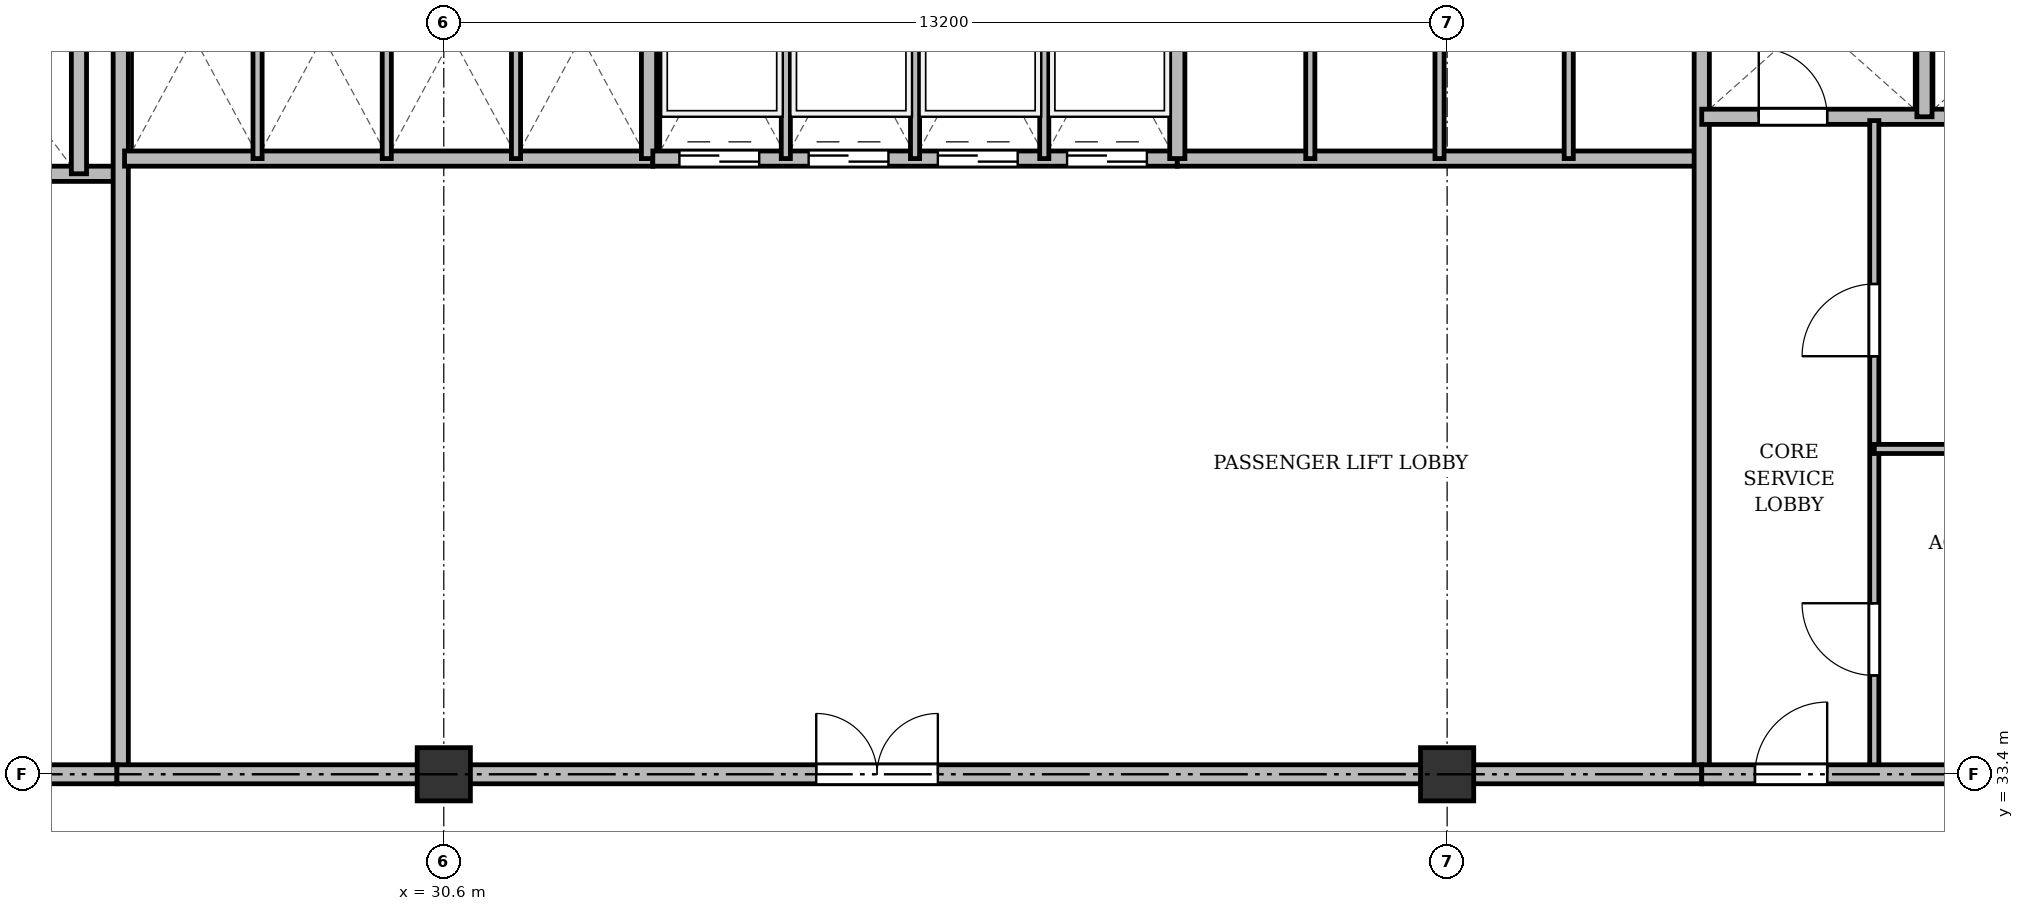
"""IFC4 building model, lengths in metres.
Left out: names, types, materials, properties, quantities, classifications, styles, units other than length and angle.
Written with IfcOpenShell. Run it as: python <this file> out.ifc"""

import sys

from ifc_helpers import new_model, si_unit, direction, frame, frame_2d, origin, origin_2d, place, context, subcontext, project, spatial, rectangle, extrude, source, transform, mapped, element, fill, save


model = new_model("IFC4")
c1 = context("Model", 3, precision=1e-05, world=origin(), true_north=direction((0.0, 1.0)))
c2 = subcontext(c1, "Body", "Model", "MODEL_VIEW")
j1 = project(units=[si_unit("LENGTHUNIT", "METRE"), si_unit("PLANEANGLEUNIT", "RADIAN")], contexts=[c1])
p1 = place(None, origin())
s1 = spatial("IfcSite", under=j1, at=p1, CompositionType="ELEMENT")
p2 = place(p1, origin())
s2 = spatial("IfcBuilding", under=s1, at=p2, CompositionType="ELEMENT")
p3 = place(p2, frame((0.0, 0.0, 132.1)))
s3 = spatial("IfcBuildingStorey", under=s2, at=p3, CompositionType="ELEMENT", Elevation=132.1)
m1 = source(origin(), c2, "Body", "SweptSolid", [
    extrude(rectangle(XDim=0.7, YDim=0.7, at=origin_2d()), origin(), (0.0, 0.0, 1.0), 3.6),
])
for number, where, z_axis, x_axis in (
    (1, (30.6, 33.4, 0.0), (0.0, 0.0, 1.0), (1.0, 0.0, 0.0)),
    (2, (43.8, 33.4, 0.0), (0.0, 0.0, 1.0), (1.0, 0.0, 0.0)),
):
    element("IfcColumn", number, at=place(p3, frame(where, z_axis=z_axis, x_axis=x_axis)), inside=s3, PredefinedType="COLUMN", context=c2, shape_type="MappedRepresentation", body=[
        mapped(m1, transform((0.0, 0.0, 0.0), x_axis=(1.0, 0.0, 0.0), y_axis=(0.0, 1.0, 0.0), z_axis=(0.0, 0.0, 1.0), scale=1.0)),
    ])
p4 = place(p3, frame((19.55, 41.3, 0.0), z_axis=(0.0, 0.0, 1.0), x_axis=(1.0, 0.0, 0.0)))
e3 = element("IfcWall", 3, at=p4, inside=s3, PredefinedType="SOLIDWALL", context=c2, shape_type="SweptSolid", body=[
    extrude(rectangle(XDim=6.75, YDim=0.2, at=frame_2d((3.375, 0.0))), origin(), (0.0, 0.0, 1.0), 3.35),
])
p5 = place(p4, frame((1.7, 0.0, 0.0)))
e4 = element("IfcOpeningElement", 4, at=p5, cuts=e3, PredefinedType="OPENING", context=c2, shape_type="SweptSolid", body=[
    extrude(rectangle(XDim=1.1, YDim=2.15, at=frame_2d((0.55, 1.075))), frame((0.0, 0.11, 0.0), z_axis=(0.0, -1.0, 0.0), x_axis=(1.0, 0.0, 0.0)), (0.0, 0.0, 1.0), 0.22),
])
p6 = place(p4, frame((4.4, 0.0, 0.0)))
e5 = element("IfcOpeningElement", 5, at=p6, cuts=e3, PredefinedType="OPENING", context=c2, shape_type="SweptSolid", body=[
    extrude(rectangle(XDim=1.1, YDim=2.15, at=frame_2d((0.55, 1.075))), frame((0.0, 0.11, 0.0), z_axis=(0.0, -1.0, 0.0), x_axis=(1.0, 0.0, 0.0)), (0.0, 0.0, 1.0), 0.22),
])
p7 = place(p3, frame((25.8, 41.3, 0.0), z_axis=(0.0, 0.0, 1.0), x_axis=(0.0, 1.0, 0.0)))
e6 = element("IfcWall", 6, at=p7, inside=s3, PredefinedType="SOLIDWALL", context=c2, shape_type="SweptSolid", body=[
    extrude(rectangle(XDim=3.4, YDim=0.2, at=frame_2d((1.7, 0.0))), origin(), (0.0, 0.0, 1.0), 3.35),
])
p8 = place(p3, frame((26.35, 33.4, 0.0), z_axis=(0.0, 0.0, 1.0), x_axis=(0.0, 1.0, 0.0)))
e7 = element("IfcWall", 7, at=p8, inside=s3, PredefinedType="SOLIDWALL", context=c2, shape_type="SweptSolid", body=[
    extrude(rectangle(XDim=11.3, YDim=0.2, at=frame_2d((5.65, 0.0))), origin(), (0.0, 0.0, 1.0), 2.75),
])
p9 = place(p3, frame((19.5, 33.4, 0.0), z_axis=(0.0, 0.0, 1.0), x_axis=(1.0, 0.0, 0.0)))
e8 = element("IfcWall", 8, at=p9, inside=s3, PredefinedType="PARTITIONING", context=c2, shape_type="SweptSolid", body=[
    extrude(rectangle(XDim=6.8, YDim=0.25, at=frame_2d((3.4, 0.0))), origin(), (0.0, 0.0, 1.0), 2.75),
])
p10 = place(p9, frame((0.75, 0.0, 0.0)))
e9 = element("IfcOpeningElement", 9, at=p10, cuts=e8, PredefinedType="OPENING", context=c2, shape_type="SweptSolid", body=[
    extrude(rectangle(XDim=1.6, YDim=2.2, at=frame_2d((0.8, 1.1))), frame((0.0, 0.135, 0.0), z_axis=(0.0, -1.0, 0.0), x_axis=(1.0, 0.0, 0.0)), (0.0, 0.0, 1.0), 0.27),
])
p11 = place(p3, frame((26.4, 41.5, 0.0), z_axis=(0.0, 0.0, 1.0), x_axis=(1.0, 0.0, 0.0)))
e10 = element("IfcWall", 10, at=p11, inside=s3, PredefinedType="SOLIDWALL", context=c2, shape_type="SweptSolid", body=[
    extrude(rectangle(XDim=6.95, YDim=0.2, at=frame_2d((3.475, 0.0))), origin(), (0.0, 0.0, 1.0), 2.85),
])
p12 = place(p3, frame((33.3, 41.5, 0.0), z_axis=(0.0, 0.0, 1.0), x_axis=(0.0, 1.0, 0.0)))
e11 = element("IfcWall", 11, at=p12, inside=s3, PredefinedType="SOLIDWALL", context=c2, shape_type="SweptSolid", body=[
    extrude(rectangle(XDim=3.2, YDim=0.2, at=frame_2d((1.6, 0.0))), origin(), (0.0, 0.0, 1.0), 3.35),
])
for number, where, z_axis, x_axis in (
    (12, (28.15, 41.5, 0.0), (0.0, 0.0, 1.0), (0.0, 1.0, 0.0)),
    (13, (29.85, 41.5, 0.0), (0.0, 0.0, 1.0), (0.0, 1.0, 0.0)),
    (14, (31.55, 41.5, 0.0), (0.0, 0.0, 1.0), (0.0, 1.0, 0.0)),
):
    element("IfcWall", number, at=place(p3, frame(where, z_axis=z_axis, x_axis=x_axis)), inside=s3, PredefinedType="PARTITIONING", context=c2, shape_type="SweptSolid", body=[
        extrude(rectangle(XDim=3.2, YDim=0.12, at=frame_2d((1.6, 0.0))), origin(), (0.0, 0.0, 1.0), 3.35),
    ])
p13 = place(p3, frame((33.35, 41.5, 0.0), z_axis=(0.0, 0.0, 1.0), x_axis=(1.0, 0.0, 0.0)))
e15 = element("IfcWall", 15, at=p13, inside=s3, PredefinedType="SOLIDWALL", context=c2, shape_type="SweptSolid", body=[
    extrude(rectangle(XDim=6.9, YDim=0.2, at=frame_2d((3.45, 0.0))), origin(), (0.0, 0.0, 1.0), 3.35),
])
p14 = place(p13, frame((0.35, 0.0, 0.0)))
e16 = element("IfcOpeningElement", 16, at=p14, cuts=e15, PredefinedType="OPENING", context=c2, shape_type="SweptSolid", body=[
    extrude(rectangle(XDim=1.05, YDim=2.15, at=frame_2d((0.525, 1.075))), frame((0.0, 0.11, 0.0), z_axis=(0.0, -1.0, 0.0), x_axis=(1.0, 0.0, 0.0)), (0.0, 0.0, 1.0), 0.22),
])
p15 = place(p13, frame((2.05, 0.0, 0.0)))
e17 = element("IfcOpeningElement", 17, at=p15, cuts=e15, PredefinedType="OPENING", context=c2, shape_type="SweptSolid", body=[
    extrude(rectangle(XDim=1.05, YDim=2.15, at=frame_2d((0.525, 1.075))), frame((0.0, 0.11, 0.0), z_axis=(0.0, -1.0, 0.0), x_axis=(1.0, 0.0, 0.0)), (0.0, 0.0, 1.0), 0.22),
])
p16 = place(p13, frame((3.75, 0.0, 0.0)))
e18 = element("IfcOpeningElement", 18, at=p16, cuts=e15, PredefinedType="OPENING", context=c2, shape_type="SweptSolid", body=[
    extrude(rectangle(XDim=1.05, YDim=2.15, at=frame_2d((0.525, 1.075))), frame((0.0, 0.11, 0.0), z_axis=(0.0, -1.0, 0.0), x_axis=(1.0, 0.0, 0.0)), (0.0, 0.0, 1.0), 0.22),
])
p17 = place(p13, frame((5.45, 0.0, 0.0)))
e19 = element("IfcOpeningElement", 19, at=p17, cuts=e15, PredefinedType="OPENING", context=c2, shape_type="SweptSolid", body=[
    extrude(rectangle(XDim=1.05, YDim=2.15, at=frame_2d((0.525, 1.075))), frame((0.0, 0.11, 0.0), z_axis=(0.0, -1.0, 0.0), x_axis=(1.0, 0.0, 0.0)), (0.0, 0.0, 1.0), 0.22),
])
for number, where, z_axis, x_axis in (
    (20, (35.1, 41.5, 0.0), (0.0, 0.0, 1.0), (0.0, 1.0, 0.0)),
    (21, (36.8, 41.5, 0.0), (0.0, 0.0, 1.0), (0.0, 1.0, 0.0)),
    (22, (38.5, 41.5, 0.0), (0.0, 0.0, 1.0), (0.0, 1.0, 0.0)),
):
    element("IfcWall", number, at=place(p3, frame(where, z_axis=z_axis, x_axis=x_axis)), inside=s3, PredefinedType="PARTITIONING", context=c2, shape_type="SweptSolid", body=[
        extrude(rectangle(XDim=3.2, YDim=0.12, at=frame_2d((1.6, 0.0))), origin(), (0.0, 0.0, 1.0), 3.35),
    ])
p18 = place(p3, frame((40.25, 41.5, 0.0), z_axis=(0.0, 0.0, 1.0), x_axis=(1.0, 0.0, 0.0)))
e23 = element("IfcWall", 23, at=p18, inside=s3, PredefinedType="SOLIDWALL", context=c2, shape_type="SweptSolid", body=[
    extrude(rectangle(XDim=6.9, YDim=0.2, at=frame_2d((3.45, 0.0))), origin(), (0.0, 0.0, 1.0), 2.85),
])
p19 = place(p3, frame((40.25, 41.5, 0.0), z_axis=(0.0, 0.0, 1.0), x_axis=(0.0, 1.0, 0.0)))
e24 = element("IfcWall", 24, at=p19, inside=s3, PredefinedType="SOLIDWALL", context=c2, shape_type="SweptSolid", body=[
    extrude(rectangle(XDim=3.2, YDim=0.2, at=frame_2d((1.6, 0.0))), origin(), (0.0, 0.0, 1.0), 3.35),
])
p20 = place(p3, frame((42.0, 41.5, 0.0), z_axis=(0.0, 0.0, 1.0), x_axis=(0.0, 1.0, 0.0)))
e25 = element("IfcWall", 25, at=p20, inside=s3, PredefinedType="PARTITIONING", context=c2, shape_type="SweptSolid", body=[
    extrude(rectangle(XDim=3.2, YDim=0.12, at=frame_2d((1.6, 0.0))), origin(), (0.0, 0.0, 1.0), 3.35),
])
p21 = place(p3, frame((43.7, 41.5, 0.0), z_axis=(0.0, 0.0, 1.0), x_axis=(0.0, 1.0, 0.0)))
e26 = element("IfcWall", 26, at=p21, inside=s3, PredefinedType="PARTITIONING", context=c2, shape_type="SweptSolid", body=[
    extrude(rectangle(XDim=3.2, YDim=0.12, at=frame_2d((1.6, 0.0))), origin(), (0.0, 0.0, 1.0), 2.85),
])
p22 = place(p3, frame((45.4, 41.5, 0.0), z_axis=(0.0, 0.0, 1.0), x_axis=(0.0, 1.0, 0.0)))
e27 = element("IfcWall", 27, at=p22, inside=s3, PredefinedType="PARTITIONING", context=c2, shape_type="SweptSolid", body=[
    extrude(rectangle(XDim=3.2, YDim=0.12, at=frame_2d((1.6, 0.0))), origin(), (0.0, 0.0, 1.0), 3.35),
])
p23 = place(p3, frame((47.15, 33.4, 0.0), z_axis=(0.0, 0.0, 1.0), x_axis=(0.0, 1.0, 0.0)))
e28 = element("IfcWall", 28, at=p23, inside=s3, PredefinedType="SOLIDWALL", context=c2, shape_type="SweptSolid", body=[
    extrude(rectangle(XDim=11.3, YDim=0.2, at=frame_2d((5.65, 0.0))), origin(), (0.0, 0.0, 1.0), 2.75),
])
p24 = place(p3, frame((26.3, 33.4, 0.0), z_axis=(0.0, 0.0, 1.0), x_axis=(1.0, 0.0, 0.0)))
e29 = element("IfcWall", 29, at=p24, inside=s3, PredefinedType="PARTITIONING", context=c2, shape_type="SweptSolid", body=[
    extrude(rectangle(XDim=20.85, YDim=0.25, at=frame_2d((10.425, 0.0))), origin(), (0.0, 0.0, 1.0), 2.75),
])
p25 = place(p24, frame((9.2, 0.0, 0.0)))
e30 = element("IfcOpeningElement", 30, at=p25, cuts=e29, PredefinedType="OPENING", context=c2, shape_type="SweptSolid", body=[
    extrude(rectangle(XDim=1.6, YDim=2.2, at=frame_2d((0.8, 1.1))), frame((0.0, 0.135, 0.0), z_axis=(0.0, -1.0, 0.0), x_axis=(1.0, 0.0, 0.0)), (0.0, 0.0, 1.0), 0.27),
])
p26 = place(p3, frame((47.15, 42.05, 0.0), z_axis=(0.0, 0.0, 1.0), x_axis=(1.0, 0.0, 0.0)))
e31 = element("IfcWall", 31, at=p26, inside=s3, PredefinedType="SOLIDWALL", context=c2, shape_type="SweptSolid", body=[
    extrude(rectangle(XDim=7.85, YDim=0.2, at=frame_2d((3.925, 0.0))), origin(), (0.0, 0.0, 1.0), 2.85),
])
p27 = place(p26, frame((0.75, 0.0, 0.0)))
e32 = element("IfcOpeningElement", 32, at=p27, cuts=e31, PredefinedType="OPENING", context=c2, shape_type="SweptSolid", body=[
    extrude(rectangle(XDim=0.9, YDim=2.1, at=frame_2d((0.45, 1.05))), frame((0.0, 0.11, 0.0), z_axis=(0.0, -1.0, 0.0), x_axis=(1.0, 0.0, 0.0)), (0.0, 0.0, 1.0), 0.22),
])
p28 = place(p26, frame((3.85, 0.0, 0.0)))
e33 = element("IfcOpeningElement", 33, at=p28, cuts=e31, PredefinedType="OPENING", context=c2, shape_type="SweptSolid", body=[
    extrude(rectangle(XDim=0.9, YDim=2.1, at=frame_2d((0.45, 1.05))), frame((0.0, 0.11, 0.0), z_axis=(0.0, -1.0, 0.0), x_axis=(1.0, 0.0, 0.0)), (0.0, 0.0, 1.0), 0.22),
])
p29 = place(p3, frame((50.08, 42.05, 0.0), z_axis=(0.0, 0.0, 1.0), x_axis=(0.0, 1.0, 0.0)))
e34 = element("IfcWall", 34, at=p29, inside=s3, PredefinedType="SOLIDWALL", context=c2, shape_type="SweptSolid", body=[
    extrude(rectangle(XDim=2.65, YDim=0.2, at=frame_2d((1.325, 0.0))), origin(), (0.0, 0.0, 1.0), 3.35),
])
p30 = place(p3, frame((49.42, 33.4, 0.0), z_axis=(0.0, 0.0, 1.0), x_axis=(0.0, 1.0, 0.0)))
e35 = element("IfcWall", 35, at=p30, inside=s3, PredefinedType="PARTITIONING", context=c2, shape_type="SweptSolid", body=[
    extrude(rectangle(XDim=8.6, YDim=0.12, at=frame_2d((4.3, 0.0))), origin(), (0.0, 0.0, 1.0), 2.75),
])
p31 = place(p30, frame((1.3, 0.0, 0.0)))
e36 = element("IfcOpeningElement", 36, at=p31, cuts=e35, PredefinedType="OPENING", context=c2, shape_type="SweptSolid", body=[
    extrude(rectangle(XDim=0.95, YDim=2.15, at=frame_2d((0.475, 1.075))), frame((0.0, 0.07, 0.0), z_axis=(0.0, -1.0, 0.0), x_axis=(1.0, 0.0, 0.0)), (0.0, 0.0, 1.0), 0.14),
])
p32 = place(p30, frame((5.5, 0.0, 0.0)))
e37 = element("IfcOpeningElement", 37, at=p32, cuts=e35, PredefinedType="OPENING", context=c2, shape_type="SweptSolid", body=[
    extrude(rectangle(XDim=0.95, YDim=2.15, at=frame_2d((0.475, 1.075))), frame((0.0, 0.07, 0.0), z_axis=(0.0, -1.0, 0.0), x_axis=(1.0, 0.0, 0.0)), (0.0, 0.0, 1.0), 0.14),
])
p33 = place(p3, frame((49.42, 37.68, 0.0), z_axis=(0.0, 0.0, 1.0), x_axis=(1.0, 0.0, 0.0)))
e38 = element("IfcWall", 38, at=p33, inside=s3, PredefinedType="PARTITIONING", context=c2, shape_type="SweptSolid", body=[
    extrude(rectangle(XDim=3.03, YDim=0.12, at=frame_2d((1.515, 0.0))), origin(), (0.0, 0.0, 1.0), 2.85),
])
p34 = place(p3, frame((47.15, 33.4, 0.0), z_axis=(0.0, 0.0, 1.0), x_axis=(1.0, 0.0, 0.0)))
e39 = element("IfcWall", 39, at=p34, inside=s3, PredefinedType="PARTITIONING", context=c2, shape_type="SweptSolid", body=[
    extrude(rectangle(XDim=11.15, YDim=0.25, at=frame_2d((5.575, 0.0))), origin(), (0.0, 0.0, 1.0), 2.75),
])
p35 = place(p34, frame((0.7, 0.0, 0.0)))
e40 = element("IfcOpeningElement", 40, at=p35, cuts=e39, PredefinedType="OPENING", context=c2, shape_type="SweptSolid", body=[
    extrude(rectangle(XDim=0.95, YDim=2.15, at=frame_2d((0.475, 1.075))), frame((0.0, 0.135, 0.0), z_axis=(0.0, -1.0, 0.0), x_axis=(1.0, 0.0, 0.0)), (0.0, 0.0, 1.0), 0.27),
])
p36 = place(p34, frame((6.0, 0.0, 0.0)))
e41 = element("IfcOpeningElement", 41, at=p36, cuts=e39, PredefinedType="OPENING", context=c2, shape_type="SweptSolid", body=[
    extrude(rectangle(XDim=1.2, YDim=2.15, at=frame_2d((0.6, 1.075))), frame((0.0, 0.135, 0.0), z_axis=(0.0, -1.0, 0.0), x_axis=(1.0, 0.0, 0.0)), (0.0, 0.0, 1.0), 0.27),
])
m2 = source(origin(), c2, "Body", "SweptSolid", [
    extrude(rectangle(XDim=1.05, YDim=2.15, at=frame_2d((0.525, 1.075))), frame((0.0, 0.025, 0.0), z_axis=(0.0, -1.0, 0.0), x_axis=(1.0, 0.0, 0.0)), (0.0, 0.0, 1.0), 0.05),
])
p37 = place(p14, origin())
e42 = element("IfcDoor", 42, at=p37, inside=s3, OperationType="DOUBLE_DOOR_SLIDING", PredefinedType="DOOR", context=c2, shape_type="MappedRepresentation", body=[
    mapped(m2, transform((0.0, 0.0, 0.0), x_axis=(1.0, 0.0, 0.0), y_axis=(0.0, 1.0, 0.0), z_axis=(0.0, 0.0, 1.0), scale=1.0)),
])
fill(e16, e42)
p38 = place(p15, origin())
e43 = element("IfcDoor", 43, at=p38, inside=s3, OperationType="DOUBLE_DOOR_SLIDING", PredefinedType="DOOR", context=c2, shape_type="MappedRepresentation", body=[
    mapped(m2, transform((0.0, 0.0, 0.0), x_axis=(1.0, 0.0, 0.0), y_axis=(0.0, 1.0, 0.0), z_axis=(0.0, 0.0, 1.0), scale=1.0)),
])
fill(e17, e43)
p39 = place(p16, origin())
e44 = element("IfcDoor", 44, at=p39, inside=s3, OperationType="DOUBLE_DOOR_SLIDING", PredefinedType="DOOR", context=c2, shape_type="MappedRepresentation", body=[
    mapped(m2, transform((0.0, 0.0, 0.0), x_axis=(1.0, 0.0, 0.0), y_axis=(0.0, 1.0, 0.0), z_axis=(0.0, 0.0, 1.0), scale=1.0)),
])
fill(e18, e44)
p40 = place(p17, origin())
e45 = element("IfcDoor", 45, at=p40, inside=s3, OperationType="DOUBLE_DOOR_SLIDING", PredefinedType="DOOR", context=c2, shape_type="MappedRepresentation", body=[
    mapped(m2, transform((0.0, 0.0, 0.0), x_axis=(1.0, 0.0, 0.0), y_axis=(0.0, 1.0, 0.0), z_axis=(0.0, 0.0, 1.0), scale=1.0)),
])
fill(e19, e45)
m3 = source(origin(), c2, "Body", "SweptSolid", [
    extrude(rectangle(XDim=1.6, YDim=2.2, at=frame_2d((0.8, 1.1))), frame((0.0, 0.025, 0.0), z_axis=(0.0, -1.0, 0.0), x_axis=(1.0, 0.0, 0.0)), (0.0, 0.0, 1.0), 0.05),
])
p41 = place(p25, origin())
e46 = element("IfcDoor", 46, at=p41, inside=s3, OperationType="DOUBLE_DOOR_SINGLE_SWING", PredefinedType="DOOR", context=c2, shape_type="MappedRepresentation", body=[
    mapped(m3, transform((0.0, 0.0, 0.0), x_axis=(1.0, 0.0, 0.0), y_axis=(0.0, 1.0, 0.0), z_axis=(0.0, 0.0, 1.0), scale=1.0)),
])
fill(e30, e46)
m4 = source(origin(), c2, "Body", "SweptSolid", [
    extrude(rectangle(XDim=0.9, YDim=2.1, at=frame_2d((0.45, 1.05))), frame((0.0, 0.025, 0.0), z_axis=(0.0, -1.0, 0.0), x_axis=(1.0, 0.0, 0.0)), (0.0, 0.0, 1.0), 0.05),
])
p42 = place(p27, origin())
e47 = element("IfcDoor", 47, at=p42, inside=s3, OperationType="SINGLE_SWING_LEFT", PredefinedType="DOOR", context=c2, shape_type="MappedRepresentation", body=[
    mapped(m4, transform((0.0, 0.0, 0.0), x_axis=(1.0, 0.0, 0.0), y_axis=(0.0, 1.0, 0.0), z_axis=(0.0, 0.0, 1.0), scale=1.0)),
])
fill(e32, e47)
m5 = source(origin(), c2, "Body", "SweptSolid", [
    extrude(rectangle(XDim=0.95, YDim=2.15, at=frame_2d((0.475, 1.075))), frame((0.0, 0.025, 0.0), z_axis=(0.0, -1.0, 0.0), x_axis=(1.0, 0.0, 0.0)), (0.0, 0.0, 1.0), 0.05),
])
p43 = place(p31, origin())
e48 = element("IfcDoor", 48, at=p43, inside=s3, OperationType="SINGLE_SWING_RIGHT", PredefinedType="DOOR", context=c2, shape_type="MappedRepresentation", body=[
    mapped(m5, transform((0.0, 0.0, 0.0), x_axis=(1.0, 0.0, 0.0), y_axis=(0.0, 1.0, 0.0), z_axis=(0.0, 0.0, 1.0), scale=1.0)),
])
fill(e36, e48)
p44 = place(p32, origin())
e49 = element("IfcDoor", 49, at=p44, inside=s3, OperationType="SINGLE_SWING_LEFT", PredefinedType="DOOR", context=c2, shape_type="MappedRepresentation", body=[
    mapped(m5, transform((0.0, 0.0, 0.0), x_axis=(1.0, 0.0, 0.0), y_axis=(0.0, 1.0, 0.0), z_axis=(0.0, 0.0, 1.0), scale=1.0)),
])
fill(e37, e49)
p45 = place(p35, origin())
e50 = element("IfcDoor", 50, at=p45, inside=s3, OperationType="SINGLE_SWING_RIGHT", PredefinedType="DOOR", context=c2, shape_type="MappedRepresentation", body=[
    mapped(m5, transform((0.0, 0.0, 0.0), x_axis=(1.0, 0.0, 0.0), y_axis=(0.0, 1.0, 0.0), z_axis=(0.0, 0.0, 1.0), scale=1.0)),
])
fill(e40, e50)
save(model, sys.argv[1])
